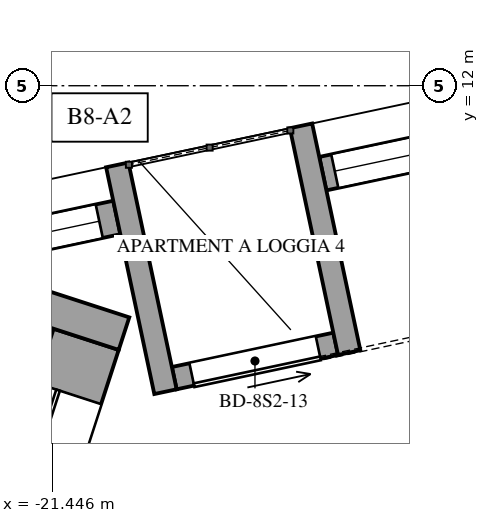
"""IFC4 building model, lengths in metres.
Left out: names, types, materials, properties, quantities, classifications, styles, units other than length and angle.
Written with IfcOpenShell. Run it as: python <this file> out.ifc"""

import sys

from ifc_helpers import new_model, si_unit, direction, frame, frame_2d, origin, place, context, subcontext, project, spatial, rectangle, extrude, element, fill, save


model = new_model("IFC4")
c1 = context("Model", 3, precision=1e-05, world=origin(), true_north=direction((0.0, 1.0)))
c2 = subcontext(c1, "Body", "Model", "MODEL_VIEW")
j1 = project(units=[si_unit("LENGTHUNIT", "METRE"), si_unit("PLANEANGLEUNIT", "RADIAN")], contexts=[c1])
p1 = place(None, origin())
s1 = spatial("IfcSite", under=j1, at=p1, CompositionType="ELEMENT")
p2 = place(p1, origin())
s2 = spatial("IfcBuilding", under=s1, at=p2, CompositionType="ELEMENT")
p3 = place(p2, frame((0.0, 0.0, 344.4)))
s3 = spatial("IfcBuildingStorey", under=s2, at=p3, CompositionType="ELEMENT", Elevation=344.4)
p4 = place(p3, frame((-15.666, 11.315, 0.0), z_axis=(0.0, 0.0, 1.0), x_axis=(-0.978148740936, -0.207906326516, 0.0)))
e1 = element("IfcWall", 1, at=p4, inside=s3, PredefinedType="SOLIDWALL", context=c2, shape_type="SweptSolid", body=[
    extrude(rectangle(XDim=2.271, YDim=0.45, at=frame_2d((1.135, 0.0))), origin(), (0.0, 0.0, 1.0), 3.3),
])
p5 = place(p4, frame((0.161, 0.0, 0.4)))
e2 = element("IfcOpeningElement", 2, at=p5, cuts=e1, PredefinedType="OPENING", context=c2, shape_type="SweptSolid", body=[
    extrude(rectangle(XDim=1.95, YDim=2.75, at=frame_2d((0.975, 1.375))), frame((0.0, 0.235, 0.0), z_axis=(0.0, -1.0, 0.0), x_axis=(1.0, 0.0, 0.0)), (0.0, 0.0, 1.0), 0.47),
])
p6 = place(p3, frame((-20.598, 10.267, 0.0), z_axis=(0.0, 0.0, 1.0), x_axis=(-0.978126168783, -0.208012494676, 0.0)))
e3 = element("IfcWall", 3, at=p6, inside=s3, PredefinedType="SOLIDWALL", context=c2, shape_type="SweptSolid", body=[
    extrude(rectangle(XDim=1.671, YDim=0.45, at=frame_2d((0.836, 0.0))), origin(), (0.0, 0.0, 1.0), 3.3),
])
p7 = place(p6, frame((0.236, 0.0, 0.4)))
e4 = element("IfcOpeningElement", 4, at=p7, cuts=e3, PredefinedType="OPENING", context=c2, shape_type="SweptSolid", body=[
    extrude(rectangle(XDim=1.2, YDim=2.1, at=frame_2d((0.6, 1.05))), frame((0.0, 0.235, 0.0), z_axis=(0.0, -1.0, 0.0), x_axis=(1.0, 0.0, 0.0)), (0.0, 0.0, 1.0), 0.47),
])
p8 = place(p3, frame((-17.718, 8.604, 0.0), z_axis=(0.0, 0.0, 1.0), x_axis=(-0.978148276005, -0.207908513891, 0.0)))
e5 = element("IfcWall", 5, at=p8, inside=s3, PredefinedType="SOLIDWALL", context=c2, shape_type="SweptSolid", body=[
    extrude(rectangle(XDim=2.171, YDim=0.3, at=frame_2d((1.085, 0.0))), origin(), (0.0, 0.0, 1.0), 3.3),
])
p9 = place(p8, frame((0.236, 0.0, 0.0)))
e6 = element("IfcOpeningElement", 6, at=p9, cuts=e5, PredefinedType="OPENING", context=c2, shape_type="SweptSolid", body=[
    extrude(rectangle(XDim=1.7, YDim=2.5, at=frame_2d((0.85, 1.25))), frame((0.0, 0.16, 0.0), z_axis=(0.0, -1.0, 0.0), x_axis=(1.0, 0.0, 0.0)), (0.0, 0.0, 1.0), 0.32),
])
p10 = place(p3, frame((-18.174, 11.472, 0.0), z_axis=(0.0, 0.0, 1.0), x_axis=(0.207894179953, -0.978151322619, 0.0)))
e7 = element("IfcWall", 7, at=p10, inside=s3, PredefinedType="SOLIDWALL", context=c2, shape_type="SweptSolid", body=[
    extrude(rectangle(XDim=3.05, YDim=0.3, at=frame_2d((1.525, 0.0))), origin(), (0.0, 0.0, 1.0), 3.3),
])
p11 = place(p3, frame((-20.592, 10.958, 0.0), z_axis=(0.0, 0.0, 1.0), x_axis=(0.207877902534, -0.978154782045, 0.0)))
e8 = element("IfcWall", 8, at=p11, inside=s3, PredefinedType="SOLIDWALL", context=c2, shape_type="SweptSolid", body=[
    extrude(rectangle(XDim=3.05, YDim=0.3, at=frame_2d((1.525, 0.0))), origin(), (0.0, 0.0, 1.0), 3.3),
])
p12 = place(p3, frame((-22.082, 5.335, 0.0), z_axis=(0.0, 0.0, 1.0), x_axis=(0.309019824916, 0.951055596592, 0.0)))
e9 = element("IfcWall", 9, at=p12, inside=s3, PredefinedType="SOLIDWALL", context=c2, shape_type="SweptSolid", body=[
    extrude(rectangle(XDim=3.5, YDim=0.9, at=frame_2d((1.75, 0.0))), origin(), (0.0, 0.0, 1.0), 3.3),
])
p13 = place(p12, frame((0.75, 0.0, 0.0)))
e10 = element("IfcOpeningElement", 10, at=p13, cuts=e9, PredefinedType="OPENING", context=c2, shape_type="SweptSolid", body=[
    extrude(rectangle(XDim=2.0, YDim=2.4, at=frame_2d((1.0, 1.2))), frame((0.0, 0.46, 0.0), z_axis=(0.0, -1.0, 0.0), x_axis=(1.0, 0.0, 0.0)), (0.0, 0.0, 1.0), 0.92),
])
p14 = place(p3, frame((-22.576, 9.412, 0.0), z_axis=(0.0, 0.0, 1.0), x_axis=(0.951064526973, -0.308992338955, 0.0)))
e11 = element("IfcWall", 11, at=p14, inside=s3, PredefinedType="SOLIDWALL", context=c2, shape_type="SweptSolid", body=[
    extrude(rectangle(XDim=2.179, YDim=0.45, at=frame_2d((1.09, 0.0))), origin(), (0.0, 0.0, 1.0), 2.55),
])
p15 = place(p5, origin())
e12 = element("IfcWindow", 12, at=p15, inside=s3, PartitioningType="SINGLE_PANEL", PredefinedType="WINDOW", context=c2, shape_type="SweptSolid", body=[
    extrude(rectangle(XDim=1.95, YDim=2.75, at=frame_2d((0.975, 1.375))), frame((0.0, 0.03, 0.0), z_axis=(0.0, -1.0, 0.0), x_axis=(1.0, 0.0, 0.0)), (0.0, 0.0, 1.0), 0.06),
])
fill(e2, e12)
p16 = place(p7, origin())
e13 = element("IfcWindow", 13, at=p16, inside=s3, PartitioningType="SINGLE_PANEL", PredefinedType="WINDOW", context=c2, shape_type="SweptSolid", body=[
    extrude(rectangle(XDim=1.2, YDim=2.1, at=frame_2d((0.6, 1.05))), frame((0.0, 0.03, 0.0), z_axis=(0.0, -1.0, 0.0), x_axis=(1.0, 0.0, 0.0)), (0.0, 0.0, 1.0), 0.06),
])
fill(e4, e13)
p17 = place(p9, origin())
e14 = element("IfcDoor", 14, at=p17, inside=s3, OperationType="SLIDING_TO_LEFT", PredefinedType="DOOR", context=c2, shape_type="SweptSolid", body=[
    extrude(rectangle(XDim=1.7, YDim=2.5, at=frame_2d((0.85, 1.25))), frame((0.0, 0.025, 0.0), z_axis=(0.0, -1.0, 0.0), x_axis=(1.0, 0.0, 0.0)), (0.0, 0.0, 1.0), 0.05),
])
fill(e6, e14)
p18 = place(p13, origin())
e15 = element("IfcDoor", 15, at=p18, inside=s3, OperationType="SLIDING_TO_LEFT", PredefinedType="DOOR", context=c2, shape_type="SweptSolid", body=[
    extrude(rectangle(XDim=2.0, YDim=2.4, at=frame_2d((1.0, 1.2))), frame((0.0, 0.025, 0.0), z_axis=(0.0, -1.0, 0.0), x_axis=(1.0, 0.0, 0.0)), (0.0, 0.0, 1.0), 0.05),
])
fill(e10, e15)
save(model, sys.argv[1])
